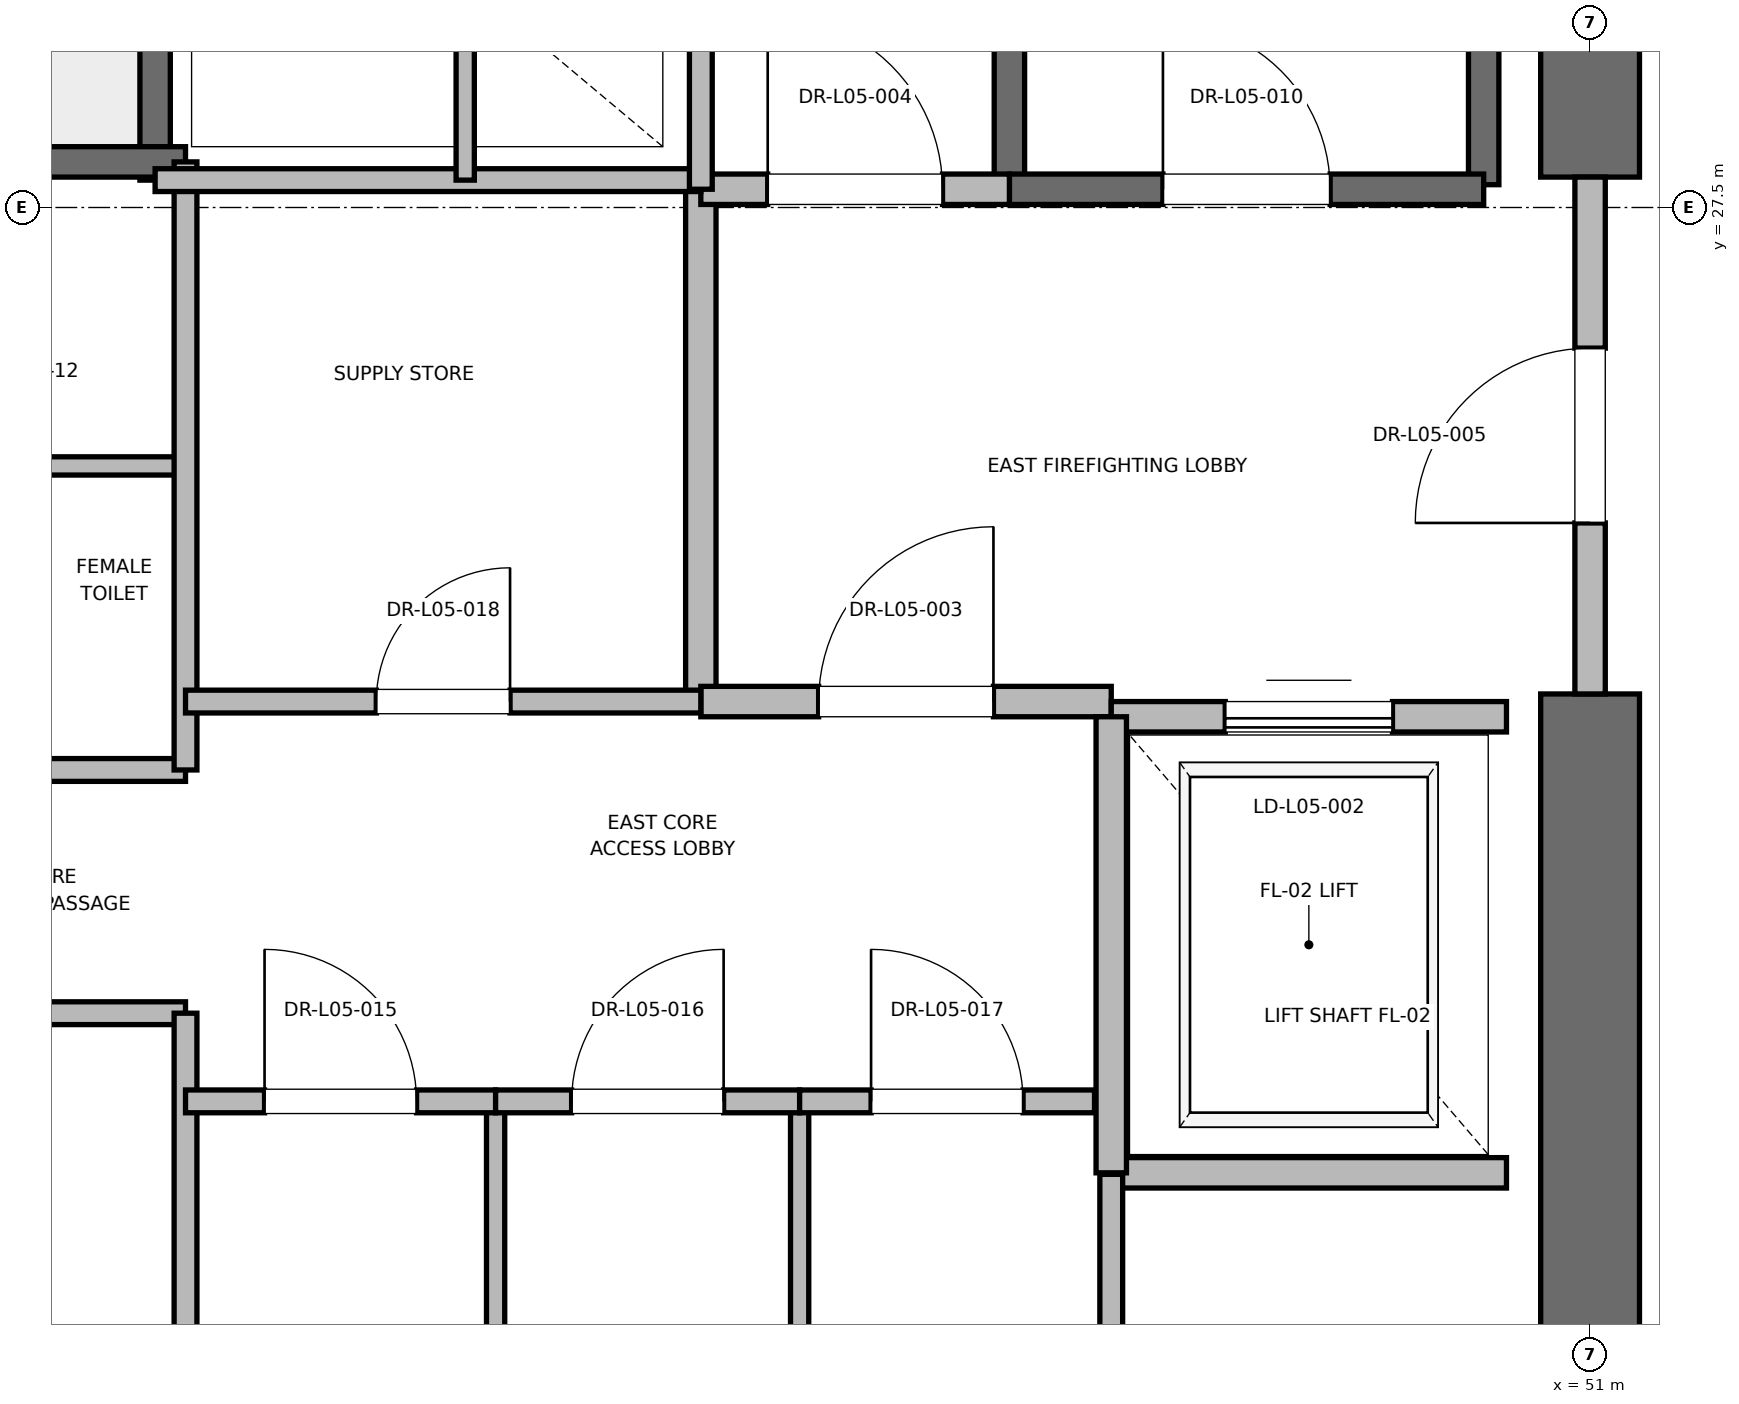
"""IFC4 building model, lengths in metres.
Left out: names, types, materials, properties, quantities, classifications, styles, units other than length and angle.
Written with IfcOpenShell. Run it as: python <this file> out.ifc"""

import sys

from ifc_helpers import new_model, si_unit, direction, frame, frame_2d, origin, place, context, subcontext, project, spatial, rectangle, extrude, element, fill, save


model = new_model("IFC4")
c1 = context("Model", 3, precision=1e-05, world=origin(), true_north=direction((0.0, 1.0)))
c2 = subcontext(c1, "Body", "Model", "MODEL_VIEW")
j1 = project(units=[si_unit("LENGTHUNIT", "METRE"), si_unit("PLANEANGLEUNIT", "RADIAN")], contexts=[c1])
p1 = place(None, origin())
s1 = spatial("IfcSite", under=j1, at=p1, CompositionType="ELEMENT")
p2 = place(p1, origin())
s2 = spatial("IfcBuilding", under=s1, at=p2, CompositionType="ELEMENT")
p3 = place(p2, frame((0.0, 0.0, 27.6)))
s3 = spatial("IfcBuildingStorey", under=s2, at=p3, CompositionType="ELEMENT", Elevation=27.6)
p4 = place(p3, frame((51.0, 18.5, 0.0), z_axis=(0.0, 0.0, 1.0), x_axis=(0.0, 1.0, 0.0)))
e1 = element("IfcWall", 1, at=p4, inside=s3, PredefinedType="SHEAR", context=c2, shape_type="SweptSolid", body=[
    extrude(rectangle(XDim=5.8, YDim=0.65, at=frame_2d((2.9, 0.0))), origin(), (0.0, 0.0, 1.0), 3.76),
])
p5 = place(p3, frame((51.0, 27.7, 0.0), z_axis=(0.0, 0.0, 1.0), x_axis=(0.0, 1.0, 0.0)))
e2 = element("IfcWall", 2, at=p5, inside=s3, PredefinedType="SHEAR", context=c2, shape_type="SweptSolid", body=[
    extrude(rectangle(XDim=8.8, YDim=0.65, at=frame_2d((4.4, 0.0))), origin(), (0.0, 0.0, 1.0), 3.76),
])
p6 = place(p3, frame((50.3, 27.65, 0.0), z_axis=(0.0, 0.0, 1.0), x_axis=(0.0, 1.0, 0.0)))
e3 = element("IfcWall", 3, at=p6, inside=s3, PredefinedType="SOLIDWALL", context=c2, shape_type="SweptSolid", body=[
    extrude(rectangle(XDim=8.15, YDim=0.2, at=frame_2d((4.075, 0.0))), origin(), (0.0, 0.0, 1.0), 3.76),
])
p7 = place(p3, frame((47.18, 27.62, 0.0), z_axis=(0.0, 0.0, 1.0), x_axis=(0.0, 1.0, 0.0)))
e4 = element("IfcWall", 4, at=p7, inside=s3, PredefinedType="SOLIDWALL", context=c2, shape_type="SweptSolid", body=[
    extrude(rectangle(XDim=8.18, YDim=0.2, at=frame_2d((4.09, 0.0))), origin(), (0.0, 0.0, 1.0), 3.76),
])
p8 = place(p3, frame((47.18, 27.62, 0.0), z_axis=(0.0, 0.0, 1.0), x_axis=(1.0, 0.0, 0.0)))
e5 = element("IfcWall", 5, at=p8, inside=s3, PredefinedType="SOLIDWALL", context=c2, shape_type="SweptSolid", body=[
    extrude(rectangle(XDim=3.12, YDim=0.2, at=frame_2d((1.56, 0.0))), origin(), (0.0, 0.0, 1.0), 3.76),
])
p9 = place(p8, frame((1.01, 0.0, 0.0)))
e6 = element("IfcOpeningElement", 6, at=p9, cuts=e5, PredefinedType="OPENING", context=c2, shape_type="SweptSolid", body=[
    extrude(rectangle(XDim=1.1, YDim=2.15, at=frame_2d((0.55, 1.075))), frame((0.0, 0.1, 0.0), z_axis=(0.0, -1.0, 0.0), x_axis=(1.0, 0.0, 0.0)), (0.0, 0.0, 1.0), 0.2),
])
p10 = place(p3, frame((41.56, 27.68, 0.0), z_axis=(0.0, 0.0, 1.0), x_axis=(0.0, 1.0, 0.0)))
e7 = element("IfcWall", 7, at=p10, inside=s3, PredefinedType="SOLIDWALL", context=c2, shape_type="SweptSolid", body=[
    extrude(rectangle(XDim=8.57, YDim=0.2, at=frame_2d((4.285, 0.0))), origin(), (0.0, 0.0, 1.0), 3.76),
])
p11 = place(p3, frame((38.44, 27.8, 0.0), z_axis=(0.0, 0.0, 1.0), x_axis=(1.0, 0.0, 0.0)))
e8 = element("IfcWall", 8, at=p11, inside=s3, PredefinedType="SOLIDWALL", context=c2, shape_type="SweptSolid", body=[
    extrude(rectangle(XDim=3.32, YDim=0.2, at=frame_2d((1.66, 0.0))), origin(), (0.0, 0.0, 1.0), 3.76),
])
p12 = place(p3, frame((45.15, 24.25, 0.0), z_axis=(0.0, 0.0, 1.0), x_axis=(0.0, 1.0, 0.0)))
e9 = element("IfcWall", 9, at=p12, inside=s3, PredefinedType="PARTITIONING", context=c2, shape_type="SweptSolid", body=[
    extrude(rectangle(XDim=3.37, YDim=0.2, at=frame_2d((1.685, 0.0))), origin(), (0.0, 0.0, 1.0), 3.76),
])
p13 = place(p3, frame((45.15, 24.25, 0.0), z_axis=(0.0, 0.0, 1.0), x_axis=(1.0, 0.0, 0.0)))
e10 = element("IfcWall", 10, at=p13, inside=s3, PredefinedType="PARTITIONING", context=c2, shape_type="SweptSolid", body=[
    extrude(rectangle(XDim=2.7, YDim=0.2, at=frame_2d((1.35, 0.0))), origin(), (0.0, 0.0, 1.0), 3.76),
])
p14 = place(p13, frame((0.775, 0.0, 0.0)))
e11 = element("IfcOpeningElement", 11, at=p14, cuts=e10, PredefinedType="OPENING", context=c2, shape_type="SweptSolid", body=[
    extrude(rectangle(XDim=1.15, YDim=2.2, at=frame_2d((0.575, 1.1))), frame((0.0, 0.1, 0.0), z_axis=(0.0, -1.0, 0.0), x_axis=(1.0, 0.0, 0.0)), (0.0, 0.0, 1.0), 0.2),
])
p15 = place(p3, frame((45.15, 27.62, 0.0), z_axis=(0.0, 0.0, 1.0), x_axis=(1.0, 0.0, 0.0)))
e12 = element("IfcWall", 12, at=p15, inside=s3, PredefinedType="PARTITIONING", context=c2, shape_type="SweptSolid", body=[
    extrude(rectangle(XDim=2.03, YDim=0.2, at=frame_2d((1.015, 0.0))), origin(), (0.0, 0.0, 1.0), 3.76),
])
p16 = place(p15, frame((0.44, 0.0, 0.0)))
e13 = element("IfcOpeningElement", 13, at=p16, cuts=e12, PredefinedType="OPENING", context=c2, shape_type="SweptSolid", body=[
    extrude(rectangle(XDim=1.15, YDim=2.2, at=frame_2d((0.575, 1.1))), frame((0.0, 0.1, 0.0), z_axis=(0.0, -1.0, 0.0), x_axis=(1.0, 0.0, 0.0)), (0.0, 0.0, 1.0), 0.2),
])
p17 = place(p3, frame((51.0, 24.3, 0.0), z_axis=(0.0, 0.0, 1.0), x_axis=(0.0, 1.0, 0.0)))
e14 = element("IfcWall", 14, at=p17, inside=s3, PredefinedType="PARTITIONING", context=c2, shape_type="SweptSolid", body=[
    extrude(rectangle(XDim=3.4, YDim=0.2, at=frame_2d((1.7, 0.0))), origin(), (0.0, 0.0, 1.0), 2.54),
])
p18 = place(p17, frame((1.125, 0.0, 0.0)))
e15 = element("IfcOpeningElement", 15, at=p18, cuts=e14, PredefinedType="OPENING", context=c2, shape_type="SweptSolid", body=[
    extrude(rectangle(XDim=1.15, YDim=2.2, at=frame_2d((0.575, 1.1))), frame((0.0, 0.1, 0.0), z_axis=(0.0, -1.0, 0.0), x_axis=(1.0, 0.0, 0.0)), (0.0, 0.0, 1.0), 0.2),
])
p19 = place(p3, frame((47.85, 21.15, 0.0), z_axis=(0.0, 0.0, 1.0), x_axis=(1.0, 0.0, 0.0)))
e16 = element("IfcWall", 16, at=p19, inside=s3, PredefinedType="SOLIDWALL", context=c2, shape_type="SweptSolid", body=[
    extrude(rectangle(XDim=2.6, YDim=0.2, at=frame_2d((1.3, 0.0))), origin(), (0.0, 0.0, 1.0), 3.76),
])
p20 = place(p3, frame((50.45, 24.15, 0.0), z_axis=(0.0, 0.0, 1.0), x_axis=(-1.0, 0.0, 0.0)))
e17 = element("IfcWall", 17, at=p20, inside=s3, PredefinedType="SOLIDWALL", context=c2, shape_type="SweptSolid", body=[
    extrude(rectangle(XDim=2.6, YDim=0.2, at=frame_2d((1.3, 0.0))), origin(), (0.0, 0.0, 1.0), 2.54),
])
p21 = place(p20, frame((0.75, 0.0, 0.0)))
e18 = element("IfcOpeningElement", 18, at=p21, cuts=e17, PredefinedType="OPENING", context=c2, shape_type="SweptSolid", body=[
    extrude(rectangle(XDim=1.1, YDim=2.2, at=frame_2d((0.55, 1.1))), frame((0.0, 0.1, 0.0), z_axis=(0.0, -1.0, 0.0), x_axis=(1.0, 0.0, 0.0)), (0.0, 0.0, 1.0), 0.2),
])
p22 = place(p3, frame((47.85, 24.15, 0.0), z_axis=(0.0, 0.0, 1.0), x_axis=(0.0, -1.0, 0.0)))
e19 = element("IfcWall", 19, at=p22, inside=s3, PredefinedType="SOLIDWALL", context=c2, shape_type="SweptSolid", body=[
    extrude(rectangle(XDim=3.0, YDim=0.2, at=frame_2d((1.5, 0.0))), origin(), (0.0, 0.0, 1.0), 3.76),
])
for number, where, z_axis, x_axis in (
    (20, (39.95, 22.2, 0.0), (0.0, 0.0, 1.0), (1.0, 0.0, 0.0)),
    (21, (39.95, 23.8, 0.0), (0.0, 0.0, 1.0), (1.0, 0.0, 0.0)),
):
    element("IfcWall", number, at=place(p3, frame(where, z_axis=z_axis, x_axis=x_axis)), inside=s3, PredefinedType="PARTITIONING", context=c2, shape_type="SweptSolid", body=[
        extrude(rectangle(XDim=1.81, YDim=0.15, at=frame_2d((0.905, 0.0))), origin(), (0.0, 0.0, 1.0), 2.85),
    ])
p23 = place(p3, frame((39.95, 25.8, 0.0), z_axis=(0.0, 0.0, 1.0), x_axis=(1.0, 0.0, 0.0)))
e22 = element("IfcWall", 22, at=p23, inside=s3, PredefinedType="PARTITIONING", context=c2, shape_type="SweptSolid", body=[
    extrude(rectangle(XDim=1.81, YDim=0.12, at=frame_2d((0.905, 0.0))), origin(), (0.0, 0.0, 1.0), 2.85),
])
p24 = place(p3, frame((41.76, 18.6, 0.0), z_axis=(0.0, 0.0, 1.0), x_axis=(0.0, 1.0, 0.0)))
e23 = element("IfcWall", 23, at=p24, inside=s3, PredefinedType="PARTITIONING", context=c2, shape_type="SweptSolid", body=[
    extrude(rectangle(XDim=3.6, YDim=0.15, at=frame_2d((1.8, 0.0))), origin(), (0.0, 0.0, 1.0), 2.54),
])
p25 = place(p3, frame((41.76, 23.8, 0.0), z_axis=(0.0, 0.0, 1.0), x_axis=(0.0, 1.0, 0.0)))
e24 = element("IfcWall", 24, at=p25, inside=s3, PredefinedType="PARTITIONING", context=c2, shape_type="SweptSolid", body=[
    extrude(rectangle(XDim=4.0, YDim=0.15, at=frame_2d((2.0, 0.0))), origin(), (0.0, 0.0, 1.0), 2.85),
])
p26 = place(p3, frame((41.56, 27.68, 0.0), z_axis=(0.0, 0.0, 1.0), x_axis=(1.0, 0.0, 0.0)))
e25 = element("IfcWall", 25, at=p26, inside=s3, PredefinedType="PARTITIONING", context=c2, shape_type="SweptSolid", body=[
    extrude(rectangle(XDim=3.59, YDim=0.15, at=frame_2d((1.795, 0.0))), origin(), (0.0, 0.0, 1.0), 2.85),
])
p27 = place(p3, frame((47.85, 18.6, 0.0), z_axis=(0.0, 0.0, 1.0), x_axis=(0.0, 1.0, 0.0)))
e26 = element("IfcWall", 26, at=p27, inside=s3, PredefinedType="PARTITIONING", context=c2, shape_type="SweptSolid", body=[
    extrude(rectangle(XDim=2.54, YDim=0.15, at=frame_2d((1.27, 0.0))), origin(), (0.0, 0.0, 1.0), 2.85),
])
for number, where, z_axis, x_axis in (
    (27, (43.8, 18.6, 0.0), (0.0, 0.0, 1.0), (0.0, 1.0, 0.0)),
    (28, (45.8, 18.6, 0.0), (0.0, 0.0, 1.0), (0.0, 1.0, 0.0)),
):
    element("IfcWall", number, at=place(p3, frame(where, z_axis=z_axis, x_axis=x_axis)), inside=s3, PredefinedType="PARTITIONING", context=c2, shape_type="SweptSolid", body=[
        extrude(rectangle(XDim=3.02, YDim=0.12, at=frame_2d((1.51, 0.0))), origin(), (0.0, 0.0, 1.0), 2.85),
    ])
p28 = place(p3, frame((41.76, 21.62, 0.0), z_axis=(0.0, 0.0, 1.0), x_axis=(1.0, 0.0, 0.0)))
e29 = element("IfcWall", 29, at=p28, inside=s3, PredefinedType="PARTITIONING", context=c2, shape_type="SweptSolid", body=[
    extrude(rectangle(XDim=2.04, YDim=0.15, at=frame_2d((1.02, 0.0))), origin(), (0.0, 0.0, 1.0), 2.85),
])
p29 = place(p28, frame((0.52, 0.0, 0.0)))
e30 = element("IfcOpeningElement", 30, at=p29, cuts=e29, PredefinedType="OPENING", context=c2, shape_type="SweptSolid", body=[
    extrude(rectangle(XDim=1.0, YDim=2.15, at=frame_2d((0.5, 1.075))), frame((0.0, 0.075, 0.0), z_axis=(0.0, -1.0, 0.0), x_axis=(1.0, 0.0, 0.0)), (0.0, 0.0, 1.0), 0.15),
])
p30 = place(p3, frame((43.8, 21.62, 0.0), z_axis=(0.0, 0.0, 1.0), x_axis=(1.0, 0.0, 0.0)))
e31 = element("IfcWall", 31, at=p30, inside=s3, PredefinedType="PARTITIONING", context=c2, shape_type="SweptSolid", body=[
    extrude(rectangle(XDim=2.0, YDim=0.15, at=frame_2d((1.0, 0.0))), origin(), (0.0, 0.0, 1.0), 2.85),
])
p31 = place(p30, frame((0.5, 0.0, 0.0)))
e32 = element("IfcOpeningElement", 32, at=p31, cuts=e31, PredefinedType="OPENING", context=c2, shape_type="SweptSolid", body=[
    extrude(rectangle(XDim=1.0, YDim=2.15, at=frame_2d((0.5, 1.075))), frame((0.0, 0.075, 0.0), z_axis=(0.0, -1.0, 0.0), x_axis=(1.0, 0.0, 0.0)), (0.0, 0.0, 1.0), 0.15),
])
p32 = place(p3, frame((45.8, 21.62, 0.0), z_axis=(0.0, 0.0, 1.0), x_axis=(1.0, 0.0, 0.0)))
e33 = element("IfcWall", 33, at=p32, inside=s3, PredefinedType="PARTITIONING", context=c2, shape_type="SweptSolid", body=[
    extrude(rectangle(XDim=1.94, YDim=0.15, at=frame_2d((0.97, 0.0))), origin(), (0.0, 0.0, 1.0), 2.85),
])
p33 = place(p32, frame((0.47, 0.0, 0.0)))
e34 = element("IfcOpeningElement", 34, at=p33, cuts=e33, PredefinedType="OPENING", context=c2, shape_type="SweptSolid", body=[
    extrude(rectangle(XDim=1.0, YDim=2.15, at=frame_2d((0.5, 1.075))), frame((0.0, 0.075, 0.0), z_axis=(0.0, -1.0, 0.0), x_axis=(1.0, 0.0, 0.0)), (0.0, 0.0, 1.0), 0.15),
])
p34 = place(p3, frame((41.76, 24.25, 0.0), z_axis=(0.0, 0.0, 1.0), x_axis=(1.0, 0.0, 0.0)))
e35 = element("IfcWall", 35, at=p34, inside=s3, PredefinedType="PARTITIONING", context=c2, shape_type="SweptSolid", body=[
    extrude(rectangle(XDim=3.39, YDim=0.15, at=frame_2d((1.695, 0.0))), origin(), (0.0, 0.0, 1.0), 2.85),
])
p35 = place(p34, frame((1.255, 0.0, 0.0)))
e36 = element("IfcOpeningElement", 36, at=p35, cuts=e35, PredefinedType="OPENING", context=c2, shape_type="SweptSolid", body=[
    extrude(rectangle(XDim=0.88, YDim=2.1, at=frame_2d((0.44, 1.05))), frame((0.0, 0.075, 0.0), z_axis=(0.0, -1.0, 0.0), x_axis=(1.0, 0.0, 0.0)), (0.0, 0.0, 1.0), 0.15),
])
p36 = place(p3, frame((45.15, 27.62, 0.0), z_axis=(0.0, 0.0, 1.0), x_axis=(0.0, 1.0, 0.0)))
e37 = element("IfcWall", 37, at=p36, inside=s3, PredefinedType="PARTITIONING", context=c2, shape_type="SweptSolid", body=[
    extrude(rectangle(XDim=3.1, YDim=0.15, at=frame_2d((1.55, 0.0))), origin(), (0.0, 0.0, 1.0), 2.85),
])
p37 = place(p3, frame((43.6, 27.68, 0.0), z_axis=(0.0, 0.0, 1.0), x_axis=(0.0, 1.0, 0.0)))
e38 = element("IfcWall", 38, at=p37, inside=s3, PredefinedType="PARTITIONING", context=c2, shape_type="SweptSolid", body=[
    extrude(rectangle(XDim=3.04, YDim=0.12, at=frame_2d((1.52, 0.0))), origin(), (0.0, 0.0, 1.0), 2.85),
])
p38 = place(p9, origin())
e39 = element("IfcDoor", 39, at=p38, inside=s3, OperationType="SINGLE_SWING_LEFT", PredefinedType="DOOR", context=c2, shape_type="SweptSolid", body=[
    extrude(rectangle(XDim=1.1, YDim=2.15, at=frame_2d((0.55, 1.075))), frame((0.0, 0.025, 0.0), z_axis=(0.0, -1.0, 0.0), x_axis=(1.0, 0.0, 0.0)), (0.0, 0.0, 1.0), 0.05),
])
fill(e6, e39)
p39 = place(p14, origin())
e40 = element("IfcDoor", 40, at=p39, inside=s3, OperationType="SINGLE_SWING_RIGHT", PredefinedType="DOOR", context=c2, shape_type="SweptSolid", body=[
    extrude(rectangle(XDim=1.15, YDim=2.2, at=frame_2d((0.575, 1.1))), frame((0.0, 0.025, 0.0), z_axis=(0.0, -1.0, 0.0), x_axis=(1.0, 0.0, 0.0)), (0.0, 0.0, 1.0), 0.05),
])
fill(e11, e40)
p40 = place(p16, origin())
e41 = element("IfcDoor", 41, at=p40, inside=s3, OperationType="SINGLE_SWING_LEFT", PredefinedType="DOOR", context=c2, shape_type="SweptSolid", body=[
    extrude(rectangle(XDim=1.15, YDim=2.2, at=frame_2d((0.575, 1.1))), frame((0.0, 0.025, 0.0), z_axis=(0.0, -1.0, 0.0), x_axis=(1.0, 0.0, 0.0)), (0.0, 0.0, 1.0), 0.05),
])
fill(e13, e41)
p41 = place(p18, origin())
e42 = element("IfcDoor", 42, at=p41, inside=s3, OperationType="SINGLE_SWING_LEFT", PredefinedType="DOOR", context=c2, shape_type="SweptSolid", body=[
    extrude(rectangle(XDim=1.15, YDim=2.2, at=frame_2d((0.575, 1.1))), frame((0.0, 0.025, 0.0), z_axis=(0.0, -1.0, 0.0), x_axis=(1.0, 0.0, 0.0)), (0.0, 0.0, 1.0), 0.05),
])
fill(e15, e42)
p42 = place(p21, origin())
e43 = element("IfcDoor", 43, at=p42, inside=s3, OperationType="SLIDING_TO_RIGHT", PredefinedType="DOOR", context=c2, shape_type="SweptSolid", body=[
    extrude(rectangle(XDim=1.1, YDim=2.2, at=frame_2d((0.55, 1.1))), frame((0.0, 0.025, 0.0), z_axis=(0.0, -1.0, 0.0), x_axis=(1.0, 0.0, 0.0)), (0.0, 0.0, 1.0), 0.05),
])
fill(e18, e43)
p43 = place(p29, origin())
e44 = element("IfcDoor", 44, at=p43, inside=s3, OperationType="SINGLE_SWING_LEFT", PredefinedType="DOOR", context=c2, shape_type="SweptSolid", body=[
    extrude(rectangle(XDim=1.0, YDim=2.15, at=frame_2d((0.5, 1.075))), frame((0.0, 0.025, 0.0), z_axis=(0.0, -1.0, 0.0), x_axis=(1.0, 0.0, 0.0)), (0.0, 0.0, 1.0), 0.05),
])
fill(e30, e44)
p44 = place(p31, origin())
e45 = element("IfcDoor", 45, at=p44, inside=s3, OperationType="SINGLE_SWING_RIGHT", PredefinedType="DOOR", context=c2, shape_type="SweptSolid", body=[
    extrude(rectangle(XDim=1.0, YDim=2.15, at=frame_2d((0.5, 1.075))), frame((0.0, 0.025, 0.0), z_axis=(0.0, -1.0, 0.0), x_axis=(1.0, 0.0, 0.0)), (0.0, 0.0, 1.0), 0.05),
])
fill(e32, e45)
p45 = place(p33, origin())
e46 = element("IfcDoor", 46, at=p45, inside=s3, OperationType="SINGLE_SWING_LEFT", PredefinedType="DOOR", context=c2, shape_type="SweptSolid", body=[
    extrude(rectangle(XDim=1.0, YDim=2.15, at=frame_2d((0.5, 1.075))), frame((0.0, 0.025, 0.0), z_axis=(0.0, -1.0, 0.0), x_axis=(1.0, 0.0, 0.0)), (0.0, 0.0, 1.0), 0.05),
])
fill(e34, e46)
p46 = place(p35, origin())
e47 = element("IfcDoor", 47, at=p46, inside=s3, OperationType="SINGLE_SWING_RIGHT", PredefinedType="DOOR", context=c2, shape_type="SweptSolid", body=[
    extrude(rectangle(XDim=0.88, YDim=2.1, at=frame_2d((0.44, 1.05))), frame((0.0, 0.025, 0.0), z_axis=(0.0, -1.0, 0.0), x_axis=(1.0, 0.0, 0.0)), (0.0, 0.0, 1.0), 0.05),
])
fill(e36, e47)
save(model, sys.argv[1])
